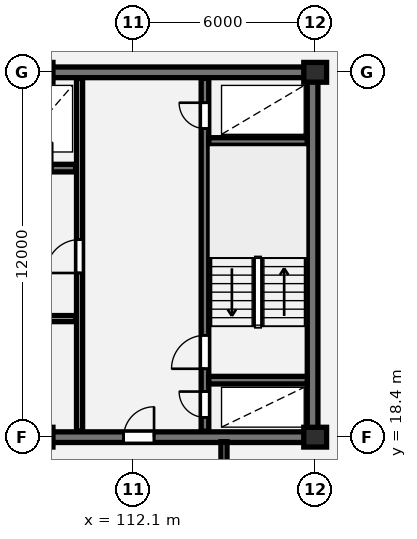
"""IFC4 building model, lengths in metres.
Left out: names, types, materials, properties, quantities, classifications, styles, units other than length and angle.
Written with IfcOpenShell. Run it as: python <this file> out.ifc"""

import sys

from ifc_helpers import new_model, si_unit, direction, frame, frame_2d, origin, origin_2d, place, context, subcontext, project, spatial, rectangle, extrude, element, fill, save


model = new_model("IFC4")
c1 = context("Model", 3, precision=1e-05, world=origin(), true_north=direction((0.0, 1.0)))
c2 = subcontext(c1, "Body", "Model", "MODEL_VIEW")
j1 = project(units=[si_unit("LENGTHUNIT", "METRE"), si_unit("PLANEANGLEUNIT", "RADIAN")], contexts=[c1])
p1 = place(None, origin())
s1 = spatial("IfcSite", under=j1, at=p1, CompositionType="ELEMENT")
p2 = place(p1, origin())
s2 = spatial("IfcBuilding", under=s1, at=p2, CompositionType="ELEMENT")
p3 = place(p2, frame((0.0, 0.0, 204.35)))
s3 = spatial("IfcBuildingStorey", under=s2, at=p3, CompositionType="ELEMENT", Elevation=204.35)
for number, where, z_axis, x_axis in (
    (1, (109.1, 18.4, 0.0), (0.0, 0.0, 1.0), (1.0, 0.0, 0.0)),
    (2, (109.1, 30.4, 0.0), (0.0, 0.0, 1.0), (1.0, 0.0, 0.0)),
    (3, (118.1, 18.4, 0.0), (0.0, 0.0, 1.0), (1.0, 0.0, 0.0)),
    (4, (118.1, 30.4, 0.0), (0.0, 0.0, 1.0), (1.0, 0.0, 0.0)),
):
    element("IfcColumn", number, at=place(p3, frame(where, z_axis=z_axis, x_axis=x_axis)), inside=s3, PredefinedType="COLUMN", context=c2, shape_type="SweptSolid", body=[
        extrude(rectangle(XDim=0.75, YDim=0.65, at=origin_2d()), origin(), (0.0, 0.0, 1.0), 3.25),
    ])
p4 = place(p3, frame((81.925, 30.4, 0.0), z_axis=(0.0, 0.0, 1.0), x_axis=(1.0, 0.0, 0.0)))
e5 = element("IfcWall", 5, at=p4, inside=s3, PredefinedType="SHEAR", context=c2, shape_type="SweptSolid", body=[
    extrude(rectangle(XDim=36.265, YDim=0.35, at=frame_2d((18.132, 0.0))), origin(), (0.0, 0.0, 1.0), 3.25),
])
p5 = place(p3, frame((118.015, 18.575, 0.0), z_axis=(0.0, 0.0, 1.0), x_axis=(0.0, 1.0, 0.0)))
e6 = element("IfcWall", 6, at=p5, inside=s3, PredefinedType="SHEAR", context=c2, shape_type="SweptSolid", body=[
    extrude(rectangle(XDim=11.65, YDim=0.35, at=frame_2d((5.825, 0.0))), origin(), (0.0, 0.0, 1.0), 3.25),
])
p6 = place(p3, frame((81.925, 18.4, 0.0), z_axis=(0.0, 0.0, 1.0), x_axis=(1.0, 0.0, 0.0)))
e7 = element("IfcWall", 7, at=p6, inside=s3, PredefinedType="SHEAR", context=c2, shape_type="SweptSolid", body=[
    extrude(rectangle(XDim=36.265, YDim=0.35, at=frame_2d((18.132, 0.0))), origin(), (0.0, 0.0, 1.0), 3.25),
])
p7 = place(p6, frame((5.675, 0.0, 0.0)))
e8 = element("IfcOpeningElement", 8, at=p7, cuts=e7, PredefinedType="OPENING", context=c2, shape_type="SweptSolid", body=[
    extrude(rectangle(XDim=1.0, YDim=2.15, at=frame_2d((0.5, 1.075))), frame((0.0, 0.185, 0.0), z_axis=(0.0, -1.0, 0.0), x_axis=(1.0, 0.0, 0.0)), (0.0, 0.0, 1.0), 0.37),
])
p8 = place(p6, frame((21.925, 0.0, 0.0)))
e9 = element("IfcOpeningElement", 9, at=p8, cuts=e7, PredefinedType="OPENING", context=c2, shape_type="SweptSolid", body=[
    extrude(rectangle(XDim=1.5, YDim=2.2, at=frame_2d((0.75, 1.1))), frame((0.0, 0.185, 0.0), z_axis=(0.0, -1.0, 0.0), x_axis=(1.0, 0.0, 0.0)), (0.0, 0.0, 1.0), 0.37),
])
p9 = place(p6, frame((29.875, 0.0, 0.0)))
e10 = element("IfcOpeningElement", 10, at=p9, cuts=e7, PredefinedType="OPENING", context=c2, shape_type="SweptSolid", body=[
    extrude(rectangle(XDim=1.0, YDim=2.15, at=frame_2d((0.5, 1.075))), frame((0.0, 0.185, 0.0), z_axis=(0.0, -1.0, 0.0), x_axis=(1.0, 0.0, 0.0)), (0.0, 0.0, 1.0), 0.37),
])
p10 = place(p3, frame((99.68, 27.25, 0.0), z_axis=(0.0, 0.0, 1.0), x_axis=(1.0, 0.0, 0.0)))
e11 = element("IfcWall", 11, at=p10, inside=s3, PredefinedType="SHEAR", context=c2, shape_type="SweptSolid", body=[
    extrude(rectangle(XDim=10.54, YDim=0.25, at=frame_2d((5.27, 0.0))), origin(), (0.0, 0.0, 1.0), 3.25),
])
p11 = place(p10, frame((8.92, 0.0, 0.0)))
e12 = element("IfcOpeningElement", 12, at=p11, cuts=e11, PredefinedType="OPENING", context=c2, shape_type="SweptSolid", body=[
    extrude(rectangle(XDim=0.85, YDim=2.05, at=frame_2d((0.425, 1.025))), frame((0.0, 0.135, 0.0), z_axis=(0.0, -1.0, 0.0), x_axis=(1.0, 0.0, 0.0)), (0.0, 0.0, 1.0), 0.27),
])
p12 = place(p3, frame((91.08, 22.3, 0.0), z_axis=(0.0, 0.0, 1.0), x_axis=(1.0, 0.0, 0.0)))
e13 = element("IfcWall", 13, at=p12, inside=s3, PredefinedType="PARTITIONING", context=c2, shape_type="SweptSolid", body=[
    extrude(rectangle(XDim=19.14, YDim=0.2, at=frame_2d((9.57, 0.0))), origin(), (0.0, 0.0, 1.0), 2.98),
])
p13 = place(p12, frame((1.15, 0.0, 0.0)))
e14 = element("IfcOpeningElement", 14, at=p13, cuts=e13, PredefinedType="OPENING", context=c2, shape_type="SweptSolid", body=[
    extrude(rectangle(XDim=0.85, YDim=2.05, at=frame_2d((0.425, 1.025))), frame((0.0, 0.11, 0.0), z_axis=(0.0, -1.0, 0.0), x_axis=(1.0, 0.0, 0.0)), (0.0, 0.0, 1.0), 0.22),
])
p14 = place(p12, frame((3.2, 0.0, 0.0)))
e15 = element("IfcOpeningElement", 15, at=p14, cuts=e13, PredefinedType="OPENING", context=c2, shape_type="SweptSolid", body=[
    extrude(rectangle(XDim=0.85, YDim=2.05, at=frame_2d((0.425, 1.025))), frame((0.0, 0.11, 0.0), z_axis=(0.0, -1.0, 0.0), x_axis=(1.0, 0.0, 0.0)), (0.0, 0.0, 1.0), 0.22),
])
p15 = place(p12, frame((12.72, 0.0, 0.0)))
e16 = element("IfcOpeningElement", 16, at=p15, cuts=e13, PredefinedType="OPENING", context=c2, shape_type="SweptSolid", body=[
    extrude(rectangle(XDim=1.5, YDim=2.2, at=frame_2d((0.75, 1.1))), frame((0.0, 0.11, 0.0), z_axis=(0.0, -1.0, 0.0), x_axis=(1.0, 0.0, 0.0)), (0.0, 0.0, 1.0), 0.22),
])
p16 = place(p12, frame((6.42, 0.0, 0.0)))
e17 = element("IfcOpeningElement", 17, at=p16, cuts=e13, PredefinedType="OPENING", context=c2, shape_type="SweptSolid", body=[
    extrude(rectangle(XDim=0.92, YDim=2.08, at=frame_2d((0.46, 1.04))), frame((0.0, 0.11, 0.0), z_axis=(0.0, -1.0, 0.0), x_axis=(1.0, 0.0, 0.0)), (0.0, 0.0, 1.0), 0.22),
])
p17 = place(p12, frame((15.87, 0.0, 0.0)))
e18 = element("IfcOpeningElement", 18, at=p17, cuts=e13, PredefinedType="OPENING", context=c2, shape_type="SweptSolid", body=[
    extrude(rectangle(XDim=0.92, YDim=2.08, at=frame_2d((0.46, 1.04))), frame((0.0, 0.11, 0.0), z_axis=(0.0, -1.0, 0.0), x_axis=(1.0, 0.0, 0.0)), (0.0, 0.0, 1.0), 0.22),
])
p18 = place(p3, frame((110.35, 18.6, 0.0), z_axis=(0.0, 0.0, 1.0), x_axis=(0.0, 1.0, 0.0)))
e19 = element("IfcWall", 19, at=p18, inside=s3, PredefinedType="PARTITIONING", context=c2, shape_type="SweptSolid", body=[
    extrude(rectangle(XDim=11.6, YDim=0.2, at=frame_2d((5.8, 0.0))), origin(), (0.0, 0.0, 1.0), 2.98),
])
p19 = place(p18, frame((5.2, 0.0, 0.0)))
e20 = element("IfcOpeningElement", 20, at=p19, cuts=e19, PredefinedType="OPENING", context=c2, shape_type="SweptSolid", body=[
    extrude(rectangle(XDim=1.1, YDim=2.15, at=frame_2d((0.55, 1.075))), frame((0.0, 0.11, 0.0), z_axis=(0.0, -1.0, 0.0), x_axis=(1.0, 0.0, 0.0)), (0.0, 0.0, 1.0), 0.22),
])
p20 = place(p3, frame((114.475, 18.6, 0.0), z_axis=(0.0, 0.0, 1.0), x_axis=(0.0, 1.0, 0.0)))
e21 = element("IfcWall", 21, at=p20, inside=s3, PredefinedType="SHEAR", context=c2, shape_type="SweptSolid", body=[
    extrude(rectangle(XDim=11.6, YDim=0.25, at=frame_2d((5.8, 0.0))), origin(), (0.0, 0.0, 1.0), 3.25),
])
p21 = place(p20, frame((0.45, 0.0, 0.0)))
e22 = element("IfcOpeningElement", 22, at=p21, cuts=e21, PredefinedType="OPENING", context=c2, shape_type="SweptSolid", body=[
    extrude(rectangle(XDim=0.85, YDim=2.05, at=frame_2d((0.425, 1.025))), frame((0.0, 0.135, 0.0), z_axis=(0.0, -1.0, 0.0), x_axis=(1.0, 0.0, 0.0)), (0.0, 0.0, 1.0), 0.27),
])
p22 = place(p20, frame((2.05, 0.0, 0.0)))
e23 = element("IfcOpeningElement", 23, at=p22, cuts=e21, PredefinedType="OPENING", context=c2, shape_type="SweptSolid", body=[
    extrude(rectangle(XDim=1.1, YDim=2.1, at=frame_2d((0.55, 1.05))), frame((0.0, 0.135, 0.0), z_axis=(0.0, -1.0, 0.0), x_axis=(1.0, 0.0, 0.0)), (0.0, 0.0, 1.0), 0.27),
])
p23 = place(p20, frame((9.95, 0.0, 0.0)))
e24 = element("IfcOpeningElement", 24, at=p23, cuts=e21, PredefinedType="OPENING", context=c2, shape_type="SweptSolid", body=[
    extrude(rectangle(XDim=0.85, YDim=2.05, at=frame_2d((0.425, 1.025))), frame((0.0, 0.135, 0.0), z_axis=(0.0, -1.0, 0.0), x_axis=(1.0, 0.0, 0.0)), (0.0, 0.0, 1.0), 0.27),
])
for number, where, z_axis, x_axis in (
    (25, (114.6, 20.275, 0.0), (0.0, 0.0, 1.0), (1.0, 0.0, 0.0)),
    (26, (114.6, 28.125, 0.0), (0.0, 0.0, 1.0), (1.0, 0.0, 0.0)),
):
    element("IfcWall", number, at=place(p3, frame(where, z_axis=z_axis, x_axis=x_axis)), inside=s3, PredefinedType="SHEAR", context=c2, shape_type="SweptSolid", body=[
        extrude(rectangle(XDim=3.24, YDim=0.25, at=frame_2d((1.62, 0.0))), origin(), (0.0, 0.0, 1.0), 3.25),
    ])
p24 = place(p3, frame((115.1, 10.5, 0.0), z_axis=(0.0, 0.0, 1.0), x_axis=(0.0, 1.0, 0.0)))
e27 = element("IfcWall", 27, at=p24, inside=s3, PredefinedType="PARTITIONING", context=c2, shape_type="SweptSolid", body=[
    extrude(rectangle(XDim=7.75, YDim=0.2, at=frame_2d((3.875, 0.0))), origin(), (0.0, 0.0, 1.0), 2.98),
])
p25 = place(p9, origin())
e28 = element("IfcDoor", 28, at=p25, inside=s3, OperationType="SINGLE_SWING_RIGHT", PredefinedType="DOOR", context=c2, shape_type="SweptSolid", body=[
    extrude(rectangle(XDim=1.0, YDim=2.15, at=frame_2d((0.5, 1.075))), frame((0.0, 0.025, 0.0), z_axis=(0.0, -1.0, 0.0), x_axis=(1.0, 0.0, 0.0)), (0.0, 0.0, 1.0), 0.05),
])
fill(e10, e28)
p26 = place(p19, origin())
e29 = element("IfcDoor", 29, at=p26, inside=s3, OperationType="SINGLE_SWING_LEFT", PredefinedType="DOOR", context=c2, shape_type="SweptSolid", body=[
    extrude(rectangle(XDim=1.1, YDim=2.15, at=frame_2d((0.55, 1.075))), frame((0.0, 0.025, 0.0), z_axis=(0.0, -1.0, 0.0), x_axis=(1.0, 0.0, 0.0)), (0.0, 0.0, 1.0), 0.05),
])
fill(e20, e29)
p27 = place(p21, origin())
e30 = element("IfcDoor", 30, at=p27, inside=s3, OperationType="SINGLE_SWING_RIGHT", PredefinedType="DOOR", context=c2, shape_type="SweptSolid", body=[
    extrude(rectangle(XDim=0.85, YDim=2.05, at=frame_2d((0.425, 1.025))), frame((0.0, 0.025, 0.0), z_axis=(0.0, -1.0, 0.0), x_axis=(1.0, 0.0, 0.0)), (0.0, 0.0, 1.0), 0.05),
])
fill(e22, e30)
p28 = place(p22, origin())
e31 = element("IfcDoor", 31, at=p28, inside=s3, OperationType="SINGLE_SWING_LEFT", PredefinedType="DOOR", context=c2, shape_type="SweptSolid", body=[
    extrude(rectangle(XDim=1.1, YDim=2.1, at=frame_2d((0.55, 1.05))), frame((0.0, 0.025, 0.0), z_axis=(0.0, -1.0, 0.0), x_axis=(1.0, 0.0, 0.0)), (0.0, 0.0, 1.0), 0.05),
])
fill(e23, e31)
p29 = place(p23, origin())
e32 = element("IfcDoor", 32, at=p29, inside=s3, OperationType="SINGLE_SWING_RIGHT", PredefinedType="DOOR", context=c2, shape_type="SweptSolid", body=[
    extrude(rectangle(XDim=0.85, YDim=2.05, at=frame_2d((0.425, 1.025))), frame((0.0, 0.025, 0.0), z_axis=(0.0, -1.0, 0.0), x_axis=(1.0, 0.0, 0.0)), (0.0, 0.0, 1.0), 0.05),
])
fill(e24, e32)
save(model, sys.argv[1])
